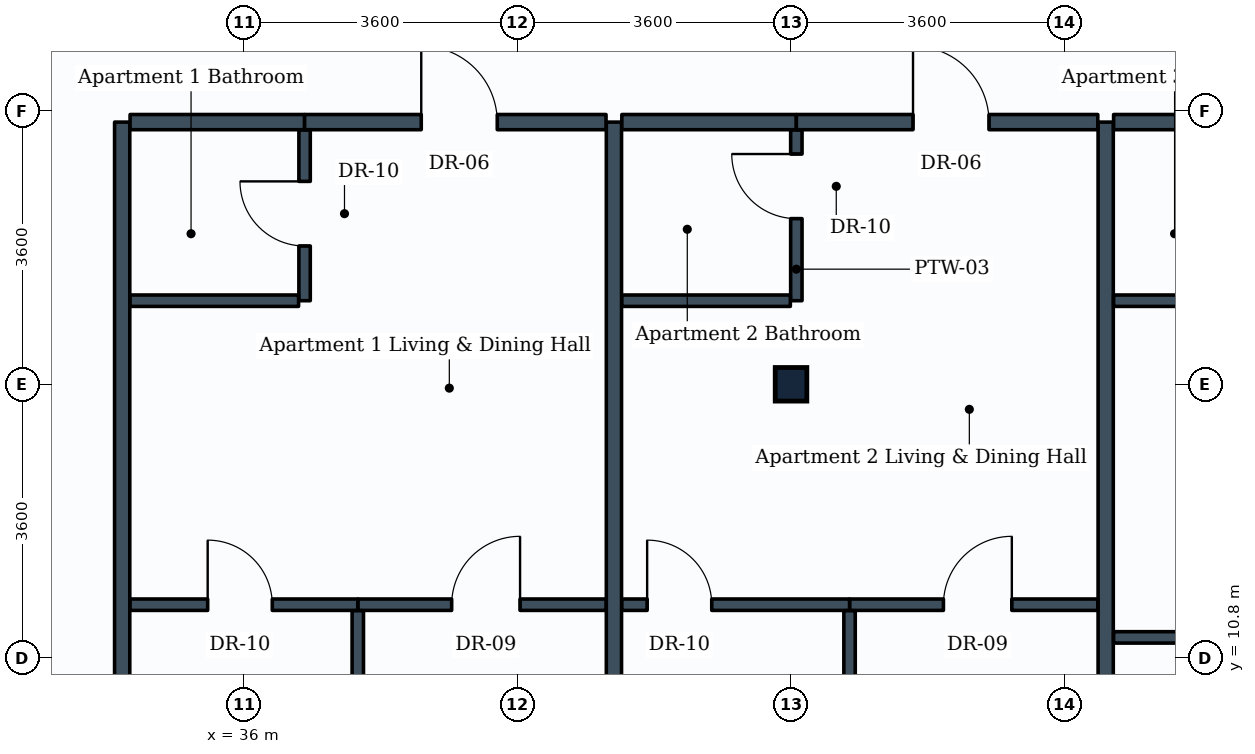
"""IFC4 building model, lengths in metres.
Left out: names, types, materials, properties, quantities, classifications, styles, units other than length and angle.
Written with IfcOpenShell. Run it as: python <this file> out.ifc"""

import sys

from ifc_helpers import new_model, si_unit, direction, frame, frame_2d, origin, origin_2d, place, context, subcontext, project, spatial, rectangle, i_section, extrude, element, fill, save


model = new_model("IFC4")
c1 = context("Model", 3, precision=1e-05, world=origin(), true_north=direction((0.0, 1.0)))
c2 = subcontext(c1, "Body", "Model", "MODEL_VIEW")
j1 = project(units=[si_unit("LENGTHUNIT", "METRE"), si_unit("PLANEANGLEUNIT", "RADIAN")], contexts=[c1])
p1 = place(None, origin())
s1 = spatial("IfcSite", under=j1, at=p1, CompositionType="ELEMENT")
p2 = place(p1, origin())
s2 = spatial("IfcBuilding", under=s1, at=p2, CompositionType="ELEMENT")
p3 = place(p2, frame((0.0, 0.0, 146.6)))
s3 = spatial("IfcBuildingStorey", under=s2, at=p3, CompositionType="ELEMENT", Elevation=146.6)
p4 = place(p3, frame((43.2, 14.4, 0.0), z_axis=(0.0, 0.0, 1.0), x_axis=(1.0, 0.0, 0.0)))
e1 = element("IfcColumn", 1, at=p4, inside=s3, PredefinedType="COLUMN", context=c2, shape_type="SweptSolid", body=[
    extrude(i_section(OverallWidth=0.416, OverallDepth=0.442, WebThickness=0.025, FlangeThickness=0.041, FilletRadius=0.015, at=origin_2d()), origin(), (0.0, 0.0, 1.0), 3.8),
])
for number, where, z_axis, x_axis in (
    (2, (34.4, 3.754, 0.0), (0.0, 0.0, 1.0), (0.0, 1.0, 0.0)),
    (3, (40.87, 3.754, 0.0), (0.0, 0.0, 1.0), (0.0, 1.0, 0.0)),
):
    element("IfcWall", number, at=place(p3, frame(where, z_axis=z_axis, x_axis=x_axis)), inside=s3, PredefinedType="PARTITIONING", context=c2, shape_type="SweptSolid", body=[
        extrude(rectangle(XDim=14.096, YDim=0.2, at=frame_2d((7.048, 0.0))), origin(), (0.0, 0.0, 1.0), 2.93),
    ])
p5 = place(p3, frame((34.504, 17.85, 0.0), z_axis=(0.0, 0.0, 1.0), x_axis=(1.0, 0.0, 0.0)))
e4 = element("IfcWall", 4, at=p5, inside=s3, PredefinedType="PARTITIONING", context=c2, shape_type="SweptSolid", body=[
    extrude(rectangle(XDim=2.296, YDim=0.2, at=frame_2d((1.148, 0.0))), origin(), (0.0, 0.0, 1.0), 3.08),
])
p6 = place(p3, frame((36.8, 15.5, 0.0), z_axis=(0.0, 0.0, 1.0), x_axis=(0.0, 1.0, 0.0)))
e5 = element("IfcWall", 5, at=p6, inside=s3, PredefinedType="PARTITIONING", context=c2, shape_type="SweptSolid", body=[
    extrude(rectangle(XDim=2.246, YDim=0.15, at=frame_2d((1.123, 0.0))), origin(), (0.0, 0.0, 1.0), 3.535),
])
p7 = place(p6, frame((0.72, 0.0, 0.0)))
e6 = element("IfcOpeningElement", 6, at=p7, cuts=e5, PredefinedType="OPENING", context=c2, shape_type="SweptSolid", body=[
    extrude(rectangle(XDim=0.85, YDim=2.1, at=frame_2d((0.425, 1.05))), frame((0.0, 0.085, 0.0), z_axis=(0.0, -1.0, 0.0), x_axis=(1.0, 0.0, 0.0)), (0.0, 0.0, 1.0), 0.17),
])
p8 = place(p3, frame((34.504, 15.5, 0.0), z_axis=(0.0, 0.0, 1.0), x_axis=(1.0, 0.0, 0.0)))
e7 = element("IfcWall", 7, at=p8, inside=s3, PredefinedType="PARTITIONING", context=c2, shape_type="SweptSolid", body=[
    extrude(rectangle(XDim=2.217, YDim=0.15, at=frame_2d((1.108, 0.0))), origin(), (0.0, 0.0, 1.0), 3.22),
])
p9 = place(p3, frame((36.8, 17.85, 0.0), z_axis=(0.0, 0.0, 1.0), x_axis=(1.0, 0.0, 0.0)))
e8 = element("IfcWall", 8, at=p9, inside=s3, PredefinedType="PARTITIONING", context=c2, shape_type="SweptSolid", body=[
    extrude(rectangle(XDim=3.966, YDim=0.2, at=frame_2d((1.983, 0.0))), origin(), (0.0, 0.0, 1.0), 3.08),
])
p10 = place(p9, frame((1.535, 0.0, 0.0)))
e9 = element("IfcOpeningElement", 9, at=p10, cuts=e8, PredefinedType="OPENING", context=c2, shape_type="SweptSolid", body=[
    extrude(rectangle(XDim=1.0, YDim=2.1, at=frame_2d((0.5, 1.05))), frame((0.0, 0.11, 0.0), z_axis=(0.0, -1.0, 0.0), x_axis=(1.0, 0.0, 0.0)), (0.0, 0.0, 1.0), 0.22),
])
p11 = place(p3, frame((37.5, 11.5, 0.0), z_axis=(0.0, 0.0, 1.0), x_axis=(1.0, 0.0, 0.0)))
e10 = element("IfcWall", 10, at=p11, inside=s3, PredefinedType="PARTITIONING", context=c2, shape_type="SweptSolid", body=[
    extrude(rectangle(XDim=3.266, YDim=0.15, at=frame_2d((1.633, 0.0))), origin(), (0.0, 0.0, 1.0), 3.17),
])
p12 = place(p11, frame((1.235, 0.0, 0.0)))
e11 = element("IfcOpeningElement", 11, at=p12, cuts=e10, PredefinedType="OPENING", context=c2, shape_type="SweptSolid", body=[
    extrude(rectangle(XDim=0.9, YDim=2.1, at=frame_2d((0.45, 1.05))), frame((0.0, 0.085, 0.0), z_axis=(0.0, -1.0, 0.0), x_axis=(1.0, 0.0, 0.0)), (0.0, 0.0, 1.0), 0.17),
])
p13 = place(p3, frame((34.504, 11.5, 0.0), z_axis=(0.0, 0.0, 1.0), x_axis=(1.0, 0.0, 0.0)))
e12 = element("IfcWall", 12, at=p13, inside=s3, PredefinedType="PARTITIONING", context=c2, shape_type="SweptSolid", body=[
    extrude(rectangle(XDim=2.996, YDim=0.15, at=frame_2d((1.498, 0.0))), origin(), (0.0, 0.0, 1.0), 3.22),
])
p14 = place(p13, frame((1.021, 0.0, 0.0)))
e13 = element("IfcOpeningElement", 13, at=p14, cuts=e12, PredefinedType="OPENING", context=c2, shape_type="SweptSolid", body=[
    extrude(rectangle(XDim=0.85, YDim=2.1, at=frame_2d((0.425, 1.05))), frame((0.0, 0.085, 0.0), z_axis=(0.0, -1.0, 0.0), x_axis=(1.0, 0.0, 0.0)), (0.0, 0.0, 1.0), 0.17),
])
p15 = place(p3, frame((37.5, 3.754, 0.0), z_axis=(0.0, 0.0, 1.0), x_axis=(0.0, 1.0, 0.0)))
e14 = element("IfcWall", 14, at=p15, inside=s3, PredefinedType="PARTITIONING", context=c2, shape_type="SweptSolid", body=[
    extrude(rectangle(XDim=7.667, YDim=0.15, at=frame_2d((3.833, 0.0))), origin(), (0.0, 0.0, 1.0), 2.93),
])
p16 = place(p3, frame((47.34, 3.754, 0.0), z_axis=(0.0, 0.0, 1.0), x_axis=(0.0, 1.0, 0.0)))
e15 = element("IfcWall", 15, at=p16, inside=s3, PredefinedType="PARTITIONING", context=c2, shape_type="SweptSolid", body=[
    extrude(rectangle(XDim=14.096, YDim=0.2, at=frame_2d((7.048, 0.0))), origin(), (0.0, 0.0, 1.0), 2.93),
])
p17 = place(p3, frame((40.974, 17.85, 0.0), z_axis=(0.0, 0.0, 1.0), x_axis=(1.0, 0.0, 0.0)))
e16 = element("IfcWall", 16, at=p17, inside=s3, PredefinedType="PARTITIONING", context=c2, shape_type="SweptSolid", body=[
    extrude(rectangle(XDim=2.296, YDim=0.2, at=frame_2d((1.148, 0.0))), origin(), (0.0, 0.0, 1.0), 3.13),
])
p18 = place(p3, frame((43.27, 15.5, 0.0), z_axis=(0.0, 0.0, 1.0), x_axis=(0.0, 1.0, 0.0)))
e17 = element("IfcWall", 17, at=p18, inside=s3, PredefinedType="PARTITIONING", context=c2, shape_type="SweptSolid", body=[
    extrude(rectangle(XDim=2.246, YDim=0.15, at=frame_2d((1.123, 0.0))), origin(), (0.0, 0.0, 1.0), 3.18),
])
p19 = place(p18, frame((1.08, 0.0, 0.0)))
e18 = element("IfcOpeningElement", 18, at=p19, cuts=e17, PredefinedType="OPENING", context=c2, shape_type="SweptSolid", body=[
    extrude(rectangle(XDim=0.85, YDim=2.1, at=frame_2d((0.425, 1.05))), frame((0.0, 0.085, 0.0), z_axis=(0.0, -1.0, 0.0), x_axis=(1.0, 0.0, 0.0)), (0.0, 0.0, 1.0), 0.17),
])
p20 = place(p3, frame((40.974, 15.5, 0.0), z_axis=(0.0, 0.0, 1.0), x_axis=(1.0, 0.0, 0.0)))
e19 = element("IfcWall", 19, at=p20, inside=s3, PredefinedType="PARTITIONING", context=c2, shape_type="SweptSolid", body=[
    extrude(rectangle(XDim=2.217, YDim=0.15, at=frame_2d((1.108, 0.0))), origin(), (0.0, 0.0, 1.0), 3.18),
])
p21 = place(p3, frame((43.27, 17.85, 0.0), z_axis=(0.0, 0.0, 1.0), x_axis=(1.0, 0.0, 0.0)))
e20 = element("IfcWall", 20, at=p21, inside=s3, PredefinedType="PARTITIONING", context=c2, shape_type="SweptSolid", body=[
    extrude(rectangle(XDim=3.966, YDim=0.2, at=frame_2d((1.983, 0.0))), origin(), (0.0, 0.0, 1.0), 3.17),
])
p22 = place(p21, frame((1.535, 0.0, 0.0)))
e21 = element("IfcOpeningElement", 21, at=p22, cuts=e20, PredefinedType="OPENING", context=c2, shape_type="SweptSolid", body=[
    extrude(rectangle(XDim=1.0, YDim=2.1, at=frame_2d((0.5, 1.05))), frame((0.0, 0.11, 0.0), z_axis=(0.0, -1.0, 0.0), x_axis=(1.0, 0.0, 0.0)), (0.0, 0.0, 1.0), 0.22),
])
p23 = place(p3, frame((43.97, 11.5, 0.0), z_axis=(0.0, 0.0, 1.0), x_axis=(1.0, 0.0, 0.0)))
e22 = element("IfcWall", 22, at=p23, inside=s3, PredefinedType="PARTITIONING", context=c2, shape_type="SweptSolid", body=[
    extrude(rectangle(XDim=3.266, YDim=0.15, at=frame_2d((1.633, 0.0))), origin(), (0.0, 0.0, 1.0), 3.17),
])
p24 = place(p23, frame((1.235, 0.0, 0.0)))
e23 = element("IfcOpeningElement", 23, at=p24, cuts=e22, PredefinedType="OPENING", context=c2, shape_type="SweptSolid", body=[
    extrude(rectangle(XDim=0.9, YDim=2.1, at=frame_2d((0.45, 1.05))), frame((0.0, 0.085, 0.0), z_axis=(0.0, -1.0, 0.0), x_axis=(1.0, 0.0, 0.0)), (0.0, 0.0, 1.0), 0.17),
])
p25 = place(p3, frame((40.974, 11.5, 0.0), z_axis=(0.0, 0.0, 1.0), x_axis=(1.0, 0.0, 0.0)))
e24 = element("IfcWall", 24, at=p25, inside=s3, PredefinedType="PARTITIONING", context=c2, shape_type="SweptSolid", body=[
    extrude(rectangle(XDim=2.996, YDim=0.15, at=frame_2d((1.498, 0.0))), origin(), (0.0, 0.0, 1.0), 3.18),
])
p26 = place(p25, frame((0.333, 0.0, 0.0)))
e25 = element("IfcOpeningElement", 25, at=p26, cuts=e24, PredefinedType="OPENING", context=c2, shape_type="SweptSolid", body=[
    extrude(rectangle(XDim=0.85, YDim=2.1, at=frame_2d((0.425, 1.05))), frame((0.0, 0.085, 0.0), z_axis=(0.0, -1.0, 0.0), x_axis=(1.0, 0.0, 0.0)), (0.0, 0.0, 1.0), 0.17),
])
p27 = place(p3, frame((43.97, 3.754, 0.0), z_axis=(0.0, 0.0, 1.0), x_axis=(0.0, 1.0, 0.0)))
e26 = element("IfcWall", 26, at=p27, inside=s3, PredefinedType="PARTITIONING", context=c2, shape_type="SweptSolid", body=[
    extrude(rectangle(XDim=7.667, YDim=0.15, at=frame_2d((3.833, 0.0))), origin(), (0.0, 0.0, 1.0), 2.93),
])
p28 = place(p3, frame((47.444, 17.85, 0.0), z_axis=(0.0, 0.0, 1.0), x_axis=(1.0, 0.0, 0.0)))
e27 = element("IfcWall", 27, at=p28, inside=s3, PredefinedType="PARTITIONING", context=c2, shape_type="SweptSolid", body=[
    extrude(rectangle(XDim=2.296, YDim=0.2, at=frame_2d((1.148, 0.0))), origin(), (0.0, 0.0, 1.0), 3.535),
])
p29 = place(p3, frame((47.444, 15.5, 0.0), z_axis=(0.0, 0.0, 1.0), x_axis=(1.0, 0.0, 0.0)))
e28 = element("IfcWall", 28, at=p29, inside=s3, PredefinedType="PARTITIONING", context=c2, shape_type="SweptSolid", body=[
    extrude(rectangle(XDim=2.217, YDim=0.15, at=frame_2d((1.108, 0.0))), origin(), (0.0, 0.0, 1.0), 3.535),
])
p30 = place(p3, frame((47.444, 11.07, 0.0), z_axis=(0.0, 0.0, 1.0), x_axis=(1.0, 0.0, 0.0)))
e29 = element("IfcWall", 29, at=p30, inside=s3, PredefinedType="PARTITIONING", context=c2, shape_type="SweptSolid", body=[
    extrude(rectangle(XDim=2.996, YDim=0.15, at=frame_2d((1.498, 0.0))), origin(), (0.0, 0.0, 1.0), 3.535),
])
p31 = place(p30, frame((1.021, 0.0, 0.0)))
e30 = element("IfcOpeningElement", 30, at=p31, cuts=e29, PredefinedType="OPENING", context=c2, shape_type="SweptSolid", body=[
    extrude(rectangle(XDim=0.85, YDim=2.1, at=frame_2d((0.425, 1.05))), frame((0.0, 0.085, 0.0), z_axis=(0.0, -1.0, 0.0), x_axis=(1.0, 0.0, 0.0)), (0.0, 0.0, 1.0), 0.17),
])
p32 = place(p7, origin())
e31 = element("IfcDoor", 31, at=p32, inside=s3, OperationType="SINGLE_SWING_RIGHT", PredefinedType="DOOR", context=c2, shape_type="SweptSolid", body=[
    extrude(rectangle(XDim=0.85, YDim=2.1, at=frame_2d((0.425, 1.05))), frame((0.0, 0.025, 0.0), z_axis=(0.0, -1.0, 0.0), x_axis=(1.0, 0.0, 0.0)), (0.0, 0.0, 1.0), 0.05),
])
fill(e6, e31)
p33 = place(p10, origin())
e32 = element("IfcDoor", 32, at=p33, inside=s3, OperationType="SINGLE_SWING_LEFT", PredefinedType="DOOR", context=c2, shape_type="SweptSolid", body=[
    extrude(rectangle(XDim=1.0, YDim=2.1, at=frame_2d((0.5, 1.05))), frame((0.0, 0.025, 0.0), z_axis=(0.0, -1.0, 0.0), x_axis=(1.0, 0.0, 0.0)), (0.0, 0.0, 1.0), 0.05),
])
fill(e9, e32)
p34 = place(p12, origin())
e33 = element("IfcDoor", 33, at=p34, inside=s3, OperationType="SINGLE_SWING_RIGHT", PredefinedType="DOOR", context=c2, shape_type="SweptSolid", body=[
    extrude(rectangle(XDim=0.9, YDim=2.1, at=frame_2d((0.45, 1.05))), frame((0.0, 0.025, 0.0), z_axis=(0.0, -1.0, 0.0), x_axis=(1.0, 0.0, 0.0)), (0.0, 0.0, 1.0), 0.05),
])
fill(e11, e33)
p35 = place(p14, origin())
e34 = element("IfcDoor", 34, at=p35, inside=s3, OperationType="SINGLE_SWING_LEFT", PredefinedType="DOOR", context=c2, shape_type="SweptSolid", body=[
    extrude(rectangle(XDim=0.85, YDim=2.1, at=frame_2d((0.425, 1.05))), frame((0.0, 0.025, 0.0), z_axis=(0.0, -1.0, 0.0), x_axis=(1.0, 0.0, 0.0)), (0.0, 0.0, 1.0), 0.05),
])
fill(e13, e34)
p36 = place(p19, origin())
e35 = element("IfcDoor", 35, at=p36, inside=s3, OperationType="SINGLE_SWING_RIGHT", PredefinedType="DOOR", context=c2, shape_type="SweptSolid", body=[
    extrude(rectangle(XDim=0.85, YDim=2.1, at=frame_2d((0.425, 1.05))), frame((0.0, 0.025, 0.0), z_axis=(0.0, -1.0, 0.0), x_axis=(1.0, 0.0, 0.0)), (0.0, 0.0, 1.0), 0.05),
])
fill(e18, e35)
p37 = place(p22, origin())
e36 = element("IfcDoor", 36, at=p37, inside=s3, OperationType="SINGLE_SWING_LEFT", PredefinedType="DOOR", context=c2, shape_type="SweptSolid", body=[
    extrude(rectangle(XDim=1.0, YDim=2.1, at=frame_2d((0.5, 1.05))), frame((0.0, 0.025, 0.0), z_axis=(0.0, -1.0, 0.0), x_axis=(1.0, 0.0, 0.0)), (0.0, 0.0, 1.0), 0.05),
])
fill(e21, e36)
p38 = place(p24, origin())
e37 = element("IfcDoor", 37, at=p38, inside=s3, OperationType="SINGLE_SWING_RIGHT", PredefinedType="DOOR", context=c2, shape_type="SweptSolid", body=[
    extrude(rectangle(XDim=0.9, YDim=2.1, at=frame_2d((0.45, 1.05))), frame((0.0, 0.025, 0.0), z_axis=(0.0, -1.0, 0.0), x_axis=(1.0, 0.0, 0.0)), (0.0, 0.0, 1.0), 0.05),
])
fill(e23, e37)
p39 = place(p26, origin())
e38 = element("IfcDoor", 38, at=p39, inside=s3, OperationType="SINGLE_SWING_LEFT", PredefinedType="DOOR", context=c2, shape_type="SweptSolid", body=[
    extrude(rectangle(XDim=0.85, YDim=2.1, at=frame_2d((0.425, 1.05))), frame((0.0, 0.025, 0.0), z_axis=(0.0, -1.0, 0.0), x_axis=(1.0, 0.0, 0.0)), (0.0, 0.0, 1.0), 0.05),
])
fill(e25, e38)
save(model, sys.argv[1])
